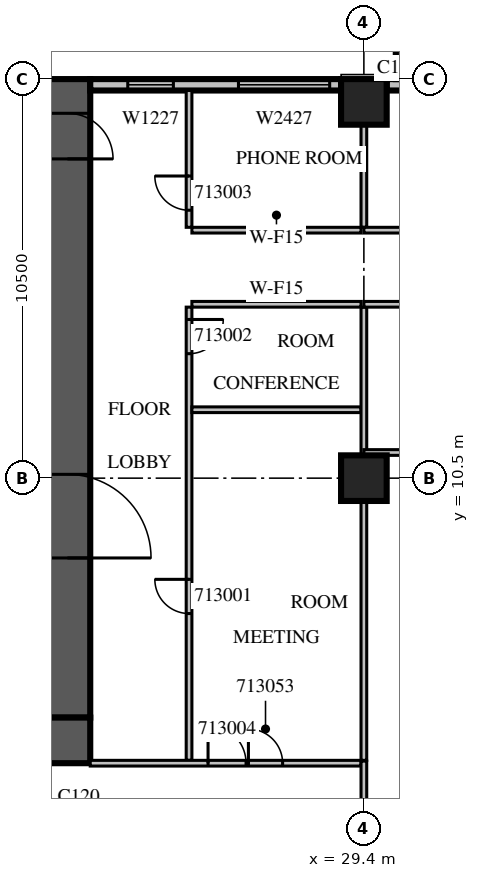
"""IFC4 building model, lengths in metres.
Left out: names, types, materials, properties, quantities, classifications, styles, units other than length and angle.
Written with IfcOpenShell. Run it as: python <this file> out.ifc"""

import sys

from ifc_helpers import new_model, si_unit, direction, frame, frame_2d, origin, origin_2d, place, context, subcontext, project, spatial, rectangle, extrude, source, transform, mapped, element, fill, save


model = new_model("IFC4")
c1 = context("Model", 3, precision=1e-05, world=origin(), true_north=direction((0.0, 1.0)))
c2 = subcontext(c1, "Body", "Model", "MODEL_VIEW")
j1 = project(units=[si_unit("LENGTHUNIT", "METRE"), si_unit("PLANEANGLEUNIT", "RADIAN")], contexts=[c1])
p1 = place(None, origin())
s1 = spatial("IfcSite", under=j1, at=p1, CompositionType="ELEMENT")
p2 = place(p1, origin())
s2 = spatial("IfcBuilding", under=s1, at=p2, CompositionType="ELEMENT")
p3 = place(p2, frame((0.0, 0.0, 65.7)))
s3 = spatial("IfcBuildingStorey", under=s2, at=p3, CompositionType="ELEMENT", Elevation=65.7)
m1 = source(origin(), c2, "Body", "SweptSolid", [
    extrude(rectangle(XDim=1.2, YDim=1.2, at=origin_2d()), origin(), (0.0, 0.0, 1.0), 4.2),
])
for number, where, z_axis, x_axis in (
    (1, (29.4, 10.5, 0.0), (0.0, 0.0, 1.0), (1.0, 0.0, 0.0)),
    (2, (29.4, 20.4, 0.0), (0.0, 0.0, 1.0), (1.0, 0.0, 0.0)),
):
    element("IfcColumn", number, at=place(p3, frame(where, z_axis=z_axis, x_axis=x_axis)), inside=s3, PredefinedType="COLUMN", context=c2, shape_type="MappedRepresentation", body=[
        mapped(m1, transform((0.0, 0.0, 0.0), scale=1.0)),
    ])
m2 = source(origin(), c2, "Body", "SweptSolid", [
    extrude(rectangle(XDim=16.8, YDim=1.2, at=frame_2d((8.4, 0.0))), origin(), (0.0, 0.0, 1.0), 4.2),
])
p4 = place(p3, frame((21.6, 4.2, 0.0), z_axis=(0.0, 0.0, 1.0), x_axis=(0.0, 1.0, 0.0)))
e3 = element("IfcWall", 3, at=p4, inside=s3, PredefinedType="SHEAR", context=c2, shape_type="MappedRepresentation", body=[
    mapped(m2, transform((0.0, 0.0, 0.0), scale=1.0)),
])
m3 = source(origin(), c2, "Body", "SweptSolid", [
    extrude(rectangle(XDim=2.2, YDim=2.1, at=frame_2d((1.1, 1.05))), frame((0.0, 0.61, 0.0), z_axis=(0.0, -1.0, 0.0), x_axis=(1.0, 0.0, 0.0)), (0.0, 0.0, 1.0), 1.22),
])
p5 = place(p4, frame((4.2, 0.0, 0.0)))
e4 = element("IfcOpeningElement", 4, at=p5, cuts=e3, PredefinedType="OPENING", context=c2, shape_type="MappedRepresentation", body=[
    mapped(m3, transform((0.0, 0.0, 0.0), scale=1.0)),
])
m4 = source(origin(), c2, "Body", "SweptSolid", [
    extrude(rectangle(XDim=1.2, YDim=2.1, at=frame_2d((0.6, 1.05))), frame((0.0, 0.61, 0.0), z_axis=(0.0, -1.0, 0.0), x_axis=(1.0, 0.0, 0.0)), (0.0, 0.0, 1.0), 1.22),
])
p6 = place(p4, frame((14.7, 0.0, 0.0)))
e5 = element("IfcOpeningElement", 5, at=p6, cuts=e3, PredefinedType="OPENING", context=c2, shape_type="MappedRepresentation", body=[
    mapped(m4, transform((0.0, 0.0, 0.0), scale=1.0)),
])
m5 = source(origin(), c2, "Body", "SweptSolid", [
    extrude(rectangle(XDim=18.0, YDim=1.2, at=frame_2d((9.0, 0.0))), origin(), (0.0, 0.0, 1.0), 4.2),
])
p7 = place(p3, frame((4.2, 3.6, 0.0), z_axis=(0.0, 0.0, 1.0), x_axis=(1.0, 0.0, 0.0)))
e6 = element("IfcWall", 6, at=p7, inside=s3, PredefinedType="SHEAR", context=c2, shape_type="MappedRepresentation", body=[
    mapped(m5, transform((0.0, 0.0, 0.0), scale=1.0)),
])
m6 = source(origin(), c2, "Body", "SweptSolid", [
    extrude(rectangle(XDim=7.2, YDim=0.3, at=frame_2d((3.6, 0.0))), origin(), (0.0, 0.0, 1.0), 3.8),
])
p8 = place(p3, frame((37.2, 20.85, 0.0), z_axis=(0.0, 0.0, 1.0), x_axis=(-1.0, 0.0, 0.0)))
e7 = element("IfcWall", 7, at=p8, inside=s3, PredefinedType="STANDARD", context=c2, shape_type="MappedRepresentation", body=[
    mapped(m6, transform((0.0, 0.0, 0.0), scale=1.0)),
])
m7 = source(origin(), c2, "Body", "SweptSolid", [
    extrude(rectangle(XDim=1.0, YDim=2.1, at=frame_2d((0.5, 1.05))), frame((0.0, 0.16, 0.0), z_axis=(0.0, -1.0, 0.0), x_axis=(1.0, 0.0, 0.0)), (0.0, 0.0, 1.0), 0.32),
])
p9 = place(p8, frame((5.06, 0.0, 0.0)))
e8 = element("IfcOpeningElement", 8, at=p9, cuts=e7, PredefinedType="OPENING", context=c2, shape_type="MappedRepresentation", body=[
    mapped(m7, transform((0.0, 0.0, 0.0), scale=1.0)),
])
m8 = source(origin(), c2, "Body", "SweptSolid", [
    extrude(rectangle(XDim=6.6, YDim=0.3, at=frame_2d((3.3, 0.0))), origin(), (0.0, 0.0, 1.0), 3.8),
])
p10 = place(p3, frame((28.8, 20.85, 0.0), z_axis=(0.0, 0.0, 1.0), x_axis=(-1.0, 0.0, 0.0)))
e9 = element("IfcWall", 9, at=p10, inside=s3, PredefinedType="STANDARD", context=c2, shape_type="MappedRepresentation", body=[
    mapped(m8, transform((0.0, 0.0, 0.0), scale=1.0)),
])
m9 = source(origin(), c2, "Body", "SweptSolid", [
    extrude(rectangle(XDim=2.4, YDim=2.7, at=frame_2d((1.2, 1.35))), frame((0.0, 0.16, 0.0), z_axis=(0.0, -1.0, 0.0), x_axis=(1.0, 0.0, 0.0)), (0.0, 0.0, 1.0), 0.32),
])
p11 = place(p10, frame((0.3, 0.0, 0.6)))
e10 = element("IfcOpeningElement", 10, at=p11, cuts=e9, PredefinedType="OPENING", context=c2, shape_type="MappedRepresentation", body=[
    mapped(m9, transform((0.0, 0.0, 0.0), scale=1.0)),
])
m10 = source(origin(), c2, "Body", "SweptSolid", [
    extrude(rectangle(XDim=1.2, YDim=2.7, at=frame_2d((0.6, 1.35))), frame((0.0, 0.16, 0.0), z_axis=(0.0, -1.0, 0.0), x_axis=(1.0, 0.0, 0.0)), (0.0, 0.0, 1.0), 0.32),
])
p12 = place(p10, frame((4.412, 0.0, 0.6)))
e11 = element("IfcOpeningElement", 11, at=p12, cuts=e9, PredefinedType="OPENING", context=c2, shape_type="MappedRepresentation", body=[
    mapped(m10, transform((0.0, 0.0, 0.0), scale=1.0)),
])
m11 = source(origin(), c2, "Body", "SweptSolid", [
    extrude(rectangle(XDim=3.9, YDim=0.2, at=frame_2d((1.95, 0.0))), origin(), (0.0, 0.0, 1.0), 3.79),
])
p13 = place(p3, frame((30.34, 21.0, 0.0), z_axis=(0.0, 0.0, 1.0), x_axis=(0.0, 1.0, 0.0)))
e12 = element("IfcWall", 12, at=p13, inside=s3, PredefinedType="SOLIDWALL", context=c2, shape_type="MappedRepresentation", body=[
    mapped(m11, transform((0.0, 0.0, 0.0), scale=1.0)),
])
m12 = source(origin(), c2, "Body", "SweptSolid", [
    extrude(rectangle(XDim=2.4, YDim=2.7, at=frame_2d((1.2, 1.35))), frame((0.0, 0.11, 0.0), z_axis=(0.0, -1.0, 0.0), x_axis=(1.0, 0.0, 0.0)), (0.0, 0.0, 1.0), 0.22),
])
p14 = place(p13, frame((0.75, 0.0, 0.6)))
e13 = element("IfcOpeningElement", 13, at=p14, cuts=e12, PredefinedType="OPENING", context=c2, shape_type="MappedRepresentation", body=[
    mapped(m12, transform((0.0, 0.0, 0.0), scale=1.0)),
])
m13 = source(origin(), c2, "Body", "SweptSolid", [
    extrude(rectangle(XDim=11.925, YDim=0.15, at=frame_2d((5.963, 0.0))), origin(), (0.0, 0.0, 1.0), 3.8),
])
p15 = place(p3, frame((24.8, 15.0, 0.0), z_axis=(0.0, 0.0, 1.0), x_axis=(0.0, -1.0, 0.0)))
e14 = element("IfcWall", 14, at=p15, inside=s3, PredefinedType="PARTITIONING", context=c2, shape_type="MappedRepresentation", body=[
    mapped(m13, transform((0.0, 0.0, 0.0), scale=1.0)),
])
m14 = source(origin(), c2, "Body", "SweptSolid", [
    extrude(rectangle(XDim=0.9, YDim=2.1, at=frame_2d((0.45, 1.05))), frame((0.0, 0.085, 0.0), z_axis=(0.0, -1.0, 0.0), x_axis=(1.0, 0.0, 0.0)), (0.0, 0.0, 1.0), 0.17),
])
p16 = place(p15, frame((7.162, 0.0, 0.0)))
e15 = element("IfcOpeningElement", 15, at=p16, cuts=e14, PredefinedType="OPENING", context=c2, shape_type="MappedRepresentation", body=[
    mapped(m14, transform((0.0, 0.0, 0.0), scale=1.0)),
])
p17 = place(p15, frame((0.325, 0.0, 0.0)))
e16 = element("IfcOpeningElement", 16, at=p17, cuts=e14, PredefinedType="OPENING", context=c2, shape_type="MappedRepresentation", body=[
    mapped(m14, transform((0.0, 0.0, 0.0), scale=1.0)),
])
m15 = source(origin(), c2, "Body", "SweptSolid", [
    extrude(rectangle(XDim=3.6, YDim=0.15, at=frame_2d((1.8, 0.0))), origin(), (0.0, 0.0, 1.0), 3.8),
])
p18 = place(p3, frame((24.8, 20.7, 0.0), z_axis=(0.0, 0.0, 1.0), x_axis=(0.0, -1.0, 0.0)))
e17 = element("IfcWall", 17, at=p18, inside=s3, PredefinedType="PARTITIONING", context=c2, shape_type="MappedRepresentation", body=[
    mapped(m15, transform((0.0, 0.0, 0.0), scale=1.0)),
])
p19 = place(p18, frame((2.25, 0.0, 0.0)))
e18 = element("IfcOpeningElement", 18, at=p19, cuts=e17, PredefinedType="OPENING", context=c2, shape_type="MappedRepresentation", body=[
    mapped(m14, transform((0.0, 0.0, 0.0), scale=1.0)),
])
p20 = place(p3, frame((29.325, 12.3, 0.0), z_axis=(0.0, 0.0, 1.0), x_axis=(-1.0, 0.0, 0.0)))
e19 = element("IfcWall", 19, at=p20, inside=s3, PredefinedType="PARTITIONING", context=c2, shape_type="SweptSolid", body=[
    extrude(rectangle(XDim=4.45, YDim=0.15, at=frame_2d((2.225, 0.0))), origin(), (0.0, 0.0, 1.0), 3.8),
])
m16 = source(origin(), c2, "Body", "SweptSolid", [
    extrude(rectangle(XDim=4.45, YDim=0.15, at=frame_2d((2.225, 0.0))), origin(), (0.0, 0.0, 1.0), 3.8),
])
for number, where, z_axis, x_axis in (
    (20, (29.325, 15.075, 0.0), (0.0, 0.0, 1.0), (-1.0, 0.0, 0.0)),
    (21, (24.875, 17.025, 0.0), (0.0, 0.0, 1.0), (1.0, 0.0, 0.0)),
):
    element("IfcWall", number, at=place(p3, frame(where, z_axis=z_axis, x_axis=x_axis)), inside=s3, PredefinedType="PARTITIONING", context=c2, shape_type="MappedRepresentation", body=[
        mapped(m16, transform((0.0, 0.0, 0.0), scale=1.0)),
    ])
m17 = source(origin(), c2, "Body", "SweptSolid", [
    extrude(rectangle(XDim=6.826, YDim=0.15, at=frame_2d((3.413, 0.0))), origin(), (0.0, 0.0, 1.0), 3.8),
])
p21 = place(p3, frame((29.4, 3.075, 0.0), z_axis=(0.0, 0.0, 1.0), x_axis=(0.0, 1.0, 0.0)))
e22 = element("IfcWall", 22, at=p21, inside=s3, PredefinedType="PARTITIONING", context=c2, shape_type="MappedRepresentation", body=[
    mapped(m17, transform((0.0, 0.0, 0.0), scale=1.0)),
])
m18 = source(origin(), c2, "Body", "SweptSolid", [
    extrude(rectangle(XDim=3.901, YDim=0.15, at=frame_2d((1.95, 0.0))), origin(), (0.0, 0.0, 1.0), 3.8),
])
p22 = place(p3, frame((29.4, 11.099, 0.0), z_axis=(0.0, 0.0, 1.0), x_axis=(0.0, 1.0, 0.0)))
e23 = element("IfcWall", 23, at=p22, inside=s3, PredefinedType="PARTITIONING", context=c2, shape_type="MappedRepresentation", body=[
    mapped(m18, transform((0.0, 0.0, 0.0), scale=1.0)),
])
m19 = source(origin(), c2, "Body", "SweptSolid", [
    extrude(rectangle(XDim=2.701, YDim=0.15, at=frame_2d((1.351, 0.0))), origin(), (0.0, 0.0, 1.0), 3.8),
])
p23 = place(p3, frame((29.4, 17.1, 0.0), z_axis=(0.0, 0.0, 1.0), x_axis=(0.0, 1.0, 0.0)))
e24 = element("IfcWall", 24, at=p23, inside=s3, PredefinedType="PARTITIONING", context=c2, shape_type="MappedRepresentation", body=[
    mapped(m19, transform((0.0, 0.0, 0.0), scale=1.0)),
])
m20 = source(origin(), c2, "Body", "SweptSolid", [
    extrude(rectangle(XDim=7.125, YDim=0.15, at=frame_2d((3.562, 0.0))), origin(), (0.0, 0.0, 1.0), 3.8),
])
p24 = place(p3, frame((22.2, 3.0, 0.0), z_axis=(0.0, 0.0, 1.0), x_axis=(1.0, 0.0, 0.0)))
e25 = element("IfcWall", 25, at=p24, inside=s3, PredefinedType="PARTITIONING", context=c2, shape_type="MappedRepresentation", body=[
    mapped(m20, transform((0.0, 0.0, 0.0), scale=1.0)),
])
m21 = source(origin(), c2, "Body", "SweptSolid", [
    extrude(rectangle(XDim=1.0, YDim=2.1, at=frame_2d((0.5, 1.05))), frame((0.0, 0.085, 0.0), z_axis=(0.0, -1.0, 0.0), x_axis=(1.0, 0.0, 0.0)), (0.0, 0.0, 1.0), 0.17),
])
p25 = place(p24, frame((3.1, 0.0, 0.0)))
e26 = element("IfcOpeningElement", 26, at=p25, cuts=e25, PredefinedType="OPENING", context=c2, shape_type="MappedRepresentation", body=[
    mapped(m21, transform((0.0, 0.0, 0.0), scale=1.0)),
])
p26 = place(p24, frame((4.162, 0.0, 0.0)))
e27 = element("IfcOpeningElement", 27, at=p26, cuts=e25, PredefinedType="OPENING", context=c2, shape_type="MappedRepresentation", body=[
    mapped(m14, transform((0.0, 0.0, 0.0), scale=1.0)),
])
m22 = source(origin(), c2, "Body", "SweptSolid", [
    extrude(rectangle(XDim=1.856, YDim=0.15, at=frame_2d((0.928, 0.0))), origin(), (0.0, 0.0, 1.0), 3.8),
])
p27 = place(p3, frame((29.4, 1.199, 0.0), z_axis=(0.0, 0.0, 1.0), x_axis=(0.0, 1.0, 0.0)))
e28 = element("IfcWall", 28, at=p27, inside=s3, PredefinedType="PARTITIONING", context=c2, shape_type="MappedRepresentation", body=[
    mapped(m22, transform((0.0, 0.0, 0.0), scale=1.0)),
])
m23 = source(origin(), c2, "Body", "SweptSolid", [
    extrude(rectangle(XDim=8.4, YDim=0.15, at=frame_2d((4.2, 0.0))), origin(), (0.0, 0.0, 1.0), 3.8),
])
p28 = place(p3, frame((37.8, 11.175, 0.0), z_axis=(0.0, 0.0, 1.0), x_axis=(-1.0, 0.0, 0.0)))
e29 = element("IfcWall", 29, at=p28, inside=s3, PredefinedType="PARTITIONING", context=c2, shape_type="MappedRepresentation", body=[
    mapped(m23, transform((0.0, 0.0, 0.0), scale=1.0)),
])
p29 = place(p28, frame((5.537, 0.0, 0.0)))
e30 = element("IfcOpeningElement", 30, at=p29, cuts=e29, PredefinedType="OPENING", context=c2, shape_type="MappedRepresentation", body=[
    mapped(m14, transform((0.0, 0.0, 0.0), scale=1.0)),
])
p30 = place(p28, frame((1.913, 0.0, 0.0)))
e31 = element("IfcOpeningElement", 31, at=p30, cuts=e29, PredefinedType="OPENING", context=c2, shape_type="MappedRepresentation", body=[
    mapped(m14, transform((0.0, 0.0, 0.0), scale=1.0)),
])
p31 = place(p3, frame((37.8, 15.075, 0.0), z_axis=(0.0, 0.0, 1.0), x_axis=(-1.0, 0.0, 0.0)))
e32 = element("IfcWall", 32, at=p31, inside=s3, PredefinedType="PARTITIONING", context=c2, shape_type="MappedRepresentation", body=[
    mapped(m23, transform((0.0, 0.0, 0.0), scale=1.0)),
])
m24 = source(origin(), c2, "Body", "SweptSolid", [
    extrude(rectangle(XDim=1.2, YDim=2.1, at=frame_2d((0.6, 1.05))), frame((0.0, 0.085, 0.0), z_axis=(0.0, -1.0, 0.0), x_axis=(1.0, 0.0, 0.0)), (0.0, 0.0, 1.0), 0.17),
])
p32 = place(p31, frame((3.6, 0.0, 0.0)))
e33 = element("IfcOpeningElement", 33, at=p32, cuts=e32, PredefinedType="OPENING", context=c2, shape_type="MappedRepresentation", body=[
    mapped(m24, transform((0.0, 0.0, 0.0), scale=1.0)),
])
m25 = source(origin(), c2, "Body", "SweptSolid", [
    extrude(rectangle(XDim=37.5, YDim=0.15, at=frame_2d((18.75, 0.0))), origin(), (0.0, 0.0, 1.0), 3.8),
])
p33 = place(p3, frame((29.4, 17.025, 0.0), z_axis=(0.0, 0.0, 1.0), x_axis=(1.0, 0.0, 0.0)))
e34 = element("IfcWall", 34, at=p33, inside=s3, PredefinedType="PARTITIONING", context=c2, shape_type="MappedRepresentation", body=[
    mapped(m25, transform((0.0, 0.0, 0.0), scale=1.0)),
])
p34 = place(p33, frame((1.357, 0.0, 0.0)))
e35 = element("IfcOpeningElement", 35, at=p34, cuts=e34, PredefinedType="OPENING", context=c2, shape_type="MappedRepresentation", body=[
    mapped(m21, transform((0.0, 0.0, 0.0), scale=1.0)),
])
p35 = place(p33, frame((4.669, 0.0, 0.0)))
e36 = element("IfcOpeningElement", 36, at=p35, cuts=e34, PredefinedType="OPENING", context=c2, shape_type="MappedRepresentation", body=[
    mapped(m21, transform((0.0, 0.0, 0.0), scale=1.0)),
])
p36 = place(p33, frame((7.012, 0.0, 0.0)))
e37 = element("IfcOpeningElement", 37, at=p36, cuts=e34, PredefinedType="OPENING", context=c2, shape_type="MappedRepresentation", body=[
    mapped(m21, transform((0.0, 0.0, 0.0), scale=1.0)),
])
p37 = place(p33, frame((9.158, 0.0, 0.0)))
e38 = element("IfcOpeningElement", 38, at=p37, cuts=e34, PredefinedType="OPENING", context=c2, shape_type="MappedRepresentation", body=[
    mapped(m14, transform((0.0, 0.0, 0.0), scale=1.0)),
])
p38 = place(p33, frame((11.258, 0.0, 0.0)))
e39 = element("IfcOpeningElement", 39, at=p38, cuts=e34, PredefinedType="OPENING", context=c2, shape_type="MappedRepresentation", body=[
    mapped(m14, transform((0.0, 0.0, 0.0), scale=1.0)),
])
p39 = place(p33, frame((14.822, 0.0, 0.0)))
e40 = element("IfcOpeningElement", 40, at=p39, cuts=e34, PredefinedType="OPENING", context=c2, shape_type="MappedRepresentation", body=[
    mapped(m14, transform((0.0, 0.0, 0.0), scale=1.0)),
])
p40 = place(p33, frame((20.13, 0.0, 0.0)))
e41 = element("IfcOpeningElement", 41, at=p40, cuts=e34, PredefinedType="OPENING", context=c2, shape_type="MappedRepresentation", body=[
    mapped(m14, transform((0.0, 0.0, 0.0), scale=1.0)),
])
p41 = place(p33, frame((25.438, 0.0, 0.0)))
e42 = element("IfcOpeningElement", 42, at=p41, cuts=e34, PredefinedType="OPENING", context=c2, shape_type="MappedRepresentation", body=[
    mapped(m14, transform((0.0, 0.0, 0.0), scale=1.0)),
])
p42 = place(p33, frame((30.364, 0.0, 0.0)))
e43 = element("IfcOpeningElement", 43, at=p42, cuts=e34, PredefinedType="OPENING", context=c2, shape_type="MappedRepresentation", body=[
    mapped(m14, transform((0.0, 0.0, 0.0), scale=1.0)),
])
p43 = place(p33, frame((34.871, 0.0, 0.0)))
e44 = element("IfcOpeningElement", 44, at=p43, cuts=e34, PredefinedType="OPENING", context=c2, shape_type="MappedRepresentation", body=[
    mapped(m14, transform((0.0, 0.0, 0.0), scale=1.0)),
])
m26 = source(origin(), c2, "Body", "SweptSolid", [
    extrude(rectangle(XDim=2.4, YDim=2.7, at=frame_2d((1.2, 1.35))), frame((0.0, 0.03, 0.0), z_axis=(0.0, -1.0, 0.0), x_axis=(1.0, 0.0, 0.0)), (0.0, 0.0, 1.0), 0.06),
])
p44 = place(p11, origin())
e45 = element("IfcWindow", 45, at=p44, inside=s3, PartitioningType="SINGLE_PANEL", PredefinedType="WINDOW", context=c2, shape_type="MappedRepresentation", body=[
    mapped(m26, transform((0.0, 0.0, 0.0), scale=1.0)),
])
fill(e10, e45)
m27 = source(origin(), c2, "Body", "SweptSolid", [
    extrude(rectangle(XDim=1.2, YDim=2.7, at=frame_2d((0.6, 1.35))), frame((0.0, 0.03, 0.0), z_axis=(0.0, -1.0, 0.0), x_axis=(1.0, 0.0, 0.0)), (0.0, 0.0, 1.0), 0.06),
])
p45 = place(p12, origin())
e46 = element("IfcWindow", 46, at=p45, inside=s3, PartitioningType="SINGLE_PANEL", PredefinedType="WINDOW", context=c2, shape_type="MappedRepresentation", body=[
    mapped(m27, transform((0.0, 0.0, 0.0), scale=1.0)),
])
fill(e11, e46)
m28 = source(origin(), c2, "Body", "SweptSolid", [
    extrude(rectangle(XDim=2.2, YDim=2.1, at=frame_2d((1.1, 1.05))), frame((0.0, 0.025, 0.0), z_axis=(0.0, -1.0, 0.0), x_axis=(1.0, 0.0, 0.0)), (0.0, 0.0, 1.0), 0.05),
])
p46 = place(p5, origin())
e47 = element("IfcDoor", 47, at=p46, inside=s3, OperationType="DOUBLE_DOOR_SINGLE_SWING", PredefinedType="DOOR", context=c2, shape_type="MappedRepresentation", body=[
    mapped(m28, transform((0.0, 0.0, 0.0), scale=1.0)),
])
fill(e4, e47)
m29 = source(origin(), c2, "Body", "SweptSolid", [
    extrude(rectangle(XDim=1.2, YDim=2.1, at=frame_2d((0.6, 1.05))), frame((0.0, 0.025, 0.0), z_axis=(0.0, -1.0, 0.0), x_axis=(1.0, 0.0, 0.0)), (0.0, 0.0, 1.0), 0.05),
])
p47 = place(p6, origin())
e48 = element("IfcDoor", 48, at=p47, inside=s3, OperationType="SINGLE_SWING_RIGHT", PredefinedType="DOOR", context=c2, shape_type="MappedRepresentation", body=[
    mapped(m29, transform((0.0, 0.0, 0.0), scale=1.0)),
])
fill(e5, e48)
m30 = source(origin(), c2, "Body", "SweptSolid", [
    extrude(rectangle(XDim=0.9, YDim=2.1, at=frame_2d((0.45, 1.05))), frame((0.0, 0.025, 0.0), z_axis=(0.0, -1.0, 0.0), x_axis=(1.0, 0.0, 0.0)), (0.0, 0.0, 1.0), 0.05),
])
p48 = place(p16, origin())
e49 = element("IfcDoor", 49, at=p48, inside=s3, OperationType="SINGLE_SWING_RIGHT", PredefinedType="DOOR", context=c2, shape_type="MappedRepresentation", body=[
    mapped(m30, transform((0.0, 0.0, 0.0), scale=1.0)),
])
fill(e15, e49)
p49 = place(p17, origin())
e50 = element("IfcDoor", 50, at=p49, inside=s3, OperationType="SINGLE_SWING_LEFT", PredefinedType="DOOR", context=c2, shape_type="MappedRepresentation", body=[
    mapped(m30, transform((0.0, 0.0, 0.0), scale=1.0)),
])
fill(e16, e50)
p50 = place(p19, origin())
e51 = element("IfcDoor", 51, at=p50, inside=s3, OperationType="SINGLE_SWING_RIGHT", PredefinedType="DOOR", context=c2, shape_type="MappedRepresentation", body=[
    mapped(m30, transform((0.0, 0.0, 0.0), scale=1.0)),
])
fill(e18, e51)
m31 = source(origin(), c2, "Body", "SweptSolid", [
    extrude(rectangle(XDim=1.0, YDim=2.1, at=frame_2d((0.5, 1.05))), frame((0.0, 0.025, 0.0), z_axis=(0.0, -1.0, 0.0), x_axis=(1.0, 0.0, 0.0)), (0.0, 0.0, 1.0), 0.05),
])
p51 = place(p25, origin())
e52 = element("IfcDoor", 52, at=p51, inside=s3, OperationType="SINGLE_SWING_LEFT", PredefinedType="DOOR", context=c2, shape_type="MappedRepresentation", body=[
    mapped(m31, transform((0.0, 0.0, 0.0), scale=1.0)),
])
fill(e26, e52)
p52 = place(p26, origin())
e53 = element("IfcDoor", 53, at=p52, inside=s3, OperationType="SINGLE_SWING_LEFT", PredefinedType="DOOR", context=c2, shape_type="MappedRepresentation", body=[
    mapped(m30, transform((0.0, 0.0, 0.0), scale=1.0)),
])
fill(e27, e53)
save(model, sys.argv[1])
